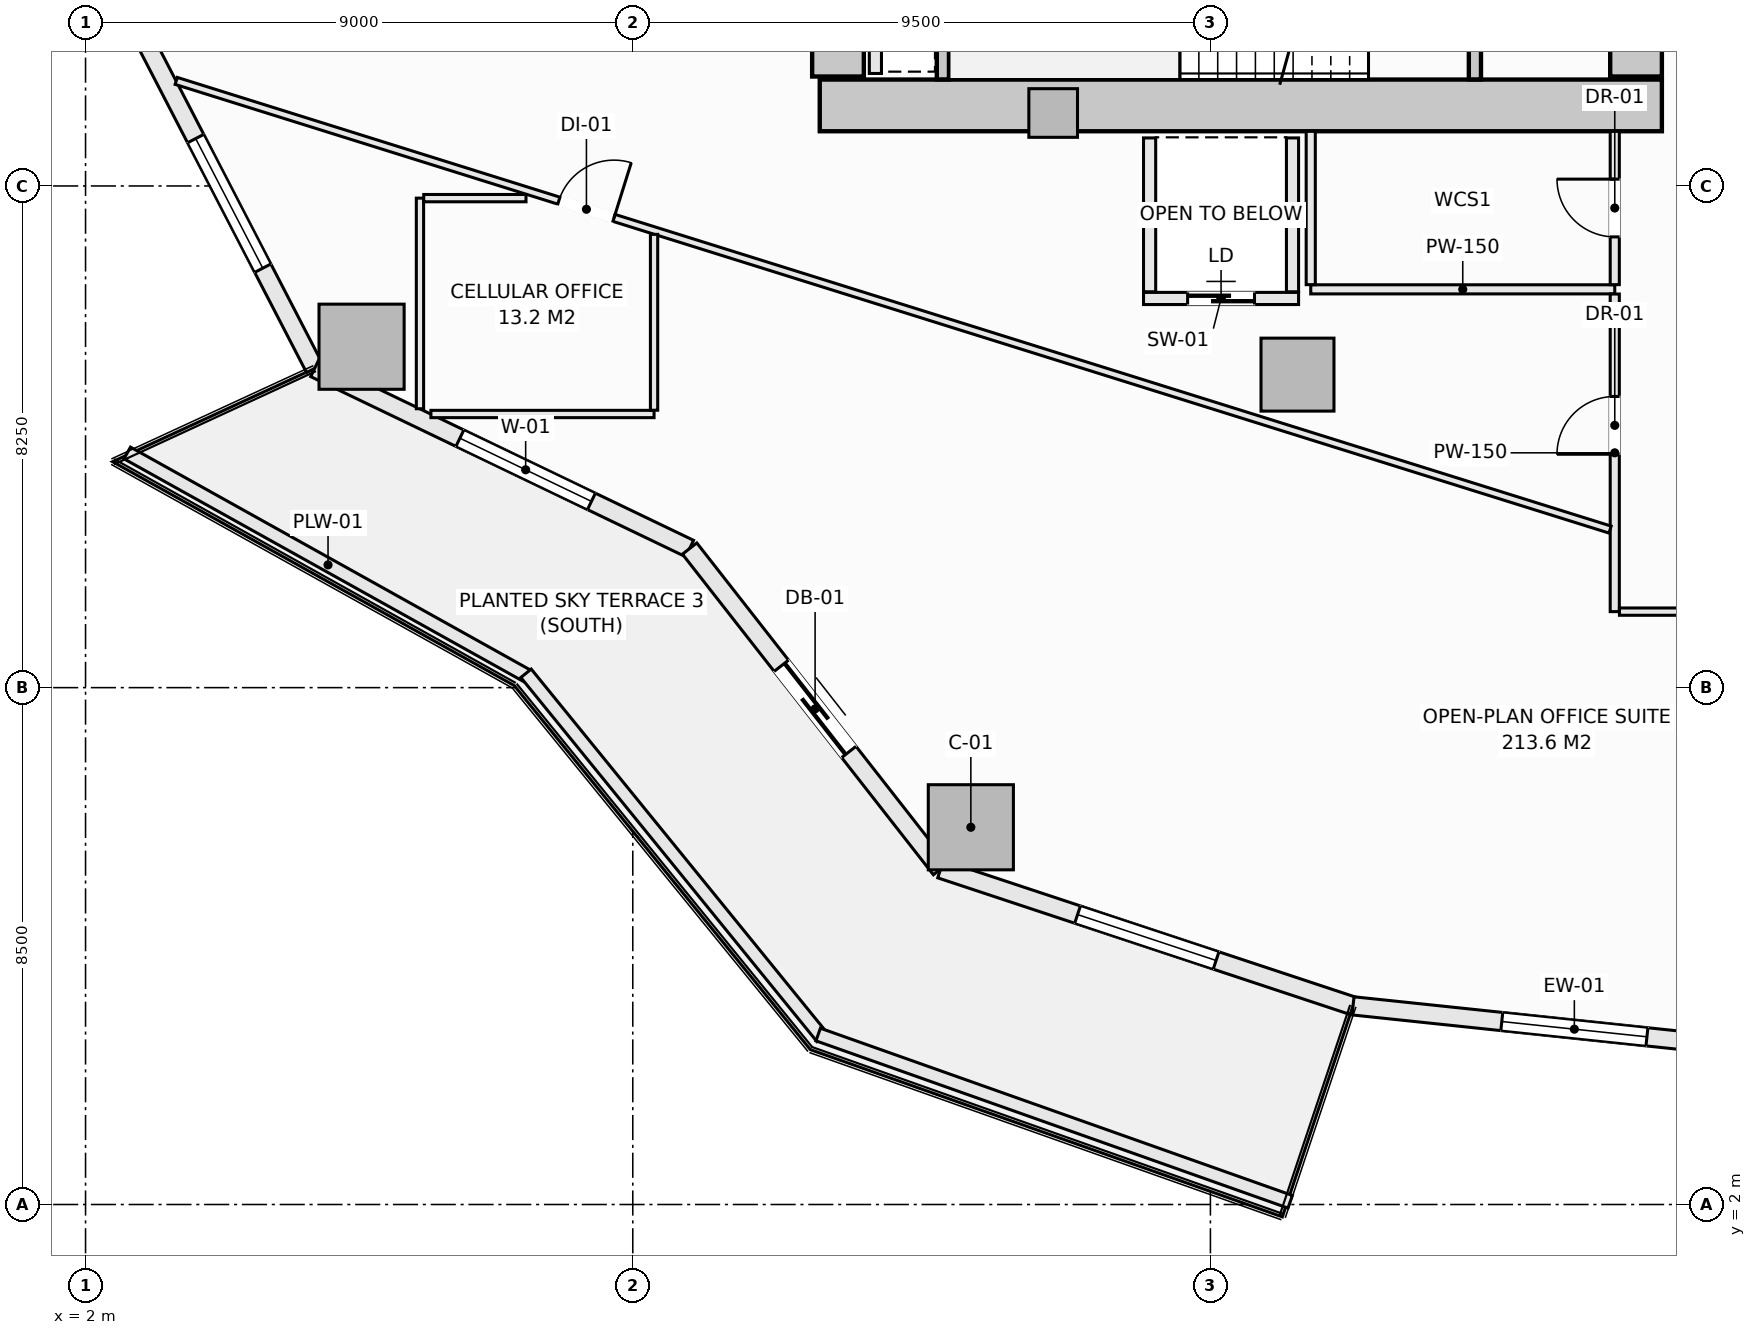
"""IFC4 building model, lengths in metres.
Left out: names, types, materials, properties, quantities, classifications, styles, units other than length and angle.
Written with IfcOpenShell. Run it as: python <this file> out.ifc"""

import sys

from ifc_helpers import new_model, si_unit, direction, frame, frame_2d, origin, origin_2d, place, context, subcontext, project, spatial, rectangle, extrude, element, fill, save


model = new_model("IFC4")
c1 = context("Model", 3, precision=1e-05, world=origin(), true_north=direction((0.0, 1.0)))
c2 = subcontext(c1, "Body", "Model", "MODEL_VIEW")
j1 = project(units=[si_unit("LENGTHUNIT", "METRE"), si_unit("PLANEANGLEUNIT", "RADIAN")], contexts=[c1])
p1 = place(None, origin())
s1 = spatial("IfcSite", under=j1, at=p1, CompositionType="ELEMENT")
p2 = place(p1, origin())
s2 = spatial("IfcBuilding", under=s1, at=p2, CompositionType="ELEMENT")
p3 = place(p2, frame((0.0, 0.0, 30.35)))
s3 = spatial("IfcBuildingStorey", under=s2, at=p3, CompositionType="ELEMENT", Elevation=30.35)
p4 = place(p3, frame((14.075, 20.075, -0.28), z_axis=(0.0, 0.0, 1.0), x_axis=(1.0, 0.0, 0.0)))
e1 = element("IfcWall", 1, at=p4, inside=s3, PredefinedType="SHEAR", context=c2, shape_type="SweptSolid", body=[
    extrude(rectangle(XDim=13.85, YDim=0.85, at=frame_2d((6.925, 0.0))), origin(), (0.0, 0.0, 1.0), 3.85),
])
p5 = place(p3, frame((14.375, 20.55, -0.28), z_axis=(0.0, 0.0, 1.0), x_axis=(0.0, 1.0, 0.0)))
e2 = element("IfcWall", 2, at=p5, inside=s3, PredefinedType="SHEAR", context=c2, shape_type="SweptSolid", body=[
    extrude(rectangle(XDim=12.9, YDim=0.85, at=frame_2d((6.45, 0.0))), origin(), (0.0, 0.0, 1.0), 3.85),
])
p6 = place(p3, frame((27.5, 20.55, -0.28), z_axis=(0.0, 0.0, 1.0), x_axis=(0.0, 1.0, 0.0)))
e3 = element("IfcWall", 3, at=p6, inside=s3, PredefinedType="SHEAR", context=c2, shape_type="SweptSolid", body=[
    extrude(rectangle(XDim=1.5, YDim=0.85, at=frame_2d((0.75, 0.0))), origin(), (0.0, 0.0, 1.0), 3.85),
])
for number, where, z_axis, x_axis in (
    (4, (6.54, 16.106, -0.28), (0.0, 0.0, 1.0), (1.0, 0.0, 0.0)),
    (5, (16.56, 8.204, -0.28), (0.0, 0.0, 1.0), (1.0, 0.0, 0.0)),
):
    element("IfcColumn", number, at=place(p3, frame(where, z_axis=z_axis, x_axis=x_axis)), inside=s3, PredefinedType="COLUMN", context=c2, shape_type="SweptSolid", body=[
        extrude(rectangle(XDim=1.4, YDim=1.4, at=origin_2d()), origin(), (0.0, 0.0, 1.0), 3.85),
    ])
p7 = place(p3, frame((21.932, 15.648, -0.28), z_axis=(0.0, 0.0, 1.0), x_axis=(1.0, 0.0, 0.0)))
e6 = element("IfcColumn", 6, at=p7, inside=s3, PredefinedType="COLUMN", context=c2, shape_type="SweptSolid", body=[
    extrude(rectangle(XDim=1.2, YDim=1.2, at=origin_2d()), origin(), (0.0, 0.0, 1.0), 3.85),
])
p8 = place(p3, frame((17.914, 19.95, -0.28), z_axis=(0.0, 0.0, 1.0), x_axis=(1.0, 0.0, 0.0)))
e7 = element("IfcColumn", 7, at=p8, inside=s3, PredefinedType="PILASTER", context=c2, shape_type="SweptSolid", body=[
    extrude(rectangle(XDim=0.8, YDim=0.8, at=origin_2d()), origin(), (0.0, 0.0, 1.0), 3.85),
])
p9 = place(p3, frame((2.958, 21.177, 0.0), z_axis=(0.0, 0.0, 1.0), x_axis=(0.459809804413, -0.88801742312, 0.0)))
e8 = element("IfcWall", 8, at=p9, inside=s3, PredefinedType="SOLIDWALL", context=c2, shape_type="SweptSolid", body=[
    extrude(rectangle(XDim=6.111, YDim=0.3, at=frame_2d((3.055, 0.0))), origin(), (0.0, 0.0, 1.0), 3.093),
])
p10 = place(p9, frame((1.855, 0.0, 0.85)))
e9 = element("IfcOpeningElement", 9, at=p10, cuts=e8, PredefinedType="OPENING", context=c2, shape_type="SweptSolid", body=[
    extrude(rectangle(XDim=2.4, YDim=1.9, at=frame_2d((1.2, 0.95))), frame((0.0, 0.16, 0.0), z_axis=(0.0, -1.0, 0.0), x_axis=(1.0, 0.0, 0.0)), (0.0, 0.0, 1.0), 0.32),
])
p11 = place(p3, frame((5.768, 15.75, 0.0), z_axis=(0.0, 0.0, 1.0), x_axis=(0.901360393999, -0.433069786673, 0.0)))
e10 = element("IfcWall", 10, at=p11, inside=s3, PredefinedType="SOLIDWALL", context=c2, shape_type="SweptSolid", body=[
    extrude(rectangle(XDim=6.842, YDim=0.3, at=frame_2d((3.421, 0.0))), origin(), (0.0, 0.0, 1.0), 3.093),
])
p12 = place(p11, frame((2.65, 0.0, 0.85)))
e11 = element("IfcOpeningElement", 11, at=p12, cuts=e10, PredefinedType="OPENING", context=c2, shape_type="SweptSolid", body=[
    extrude(rectangle(XDim=2.4, YDim=1.9, at=frame_2d((1.2, 0.95))), frame((0.0, 0.16, 0.0), z_axis=(0.0, -1.0, 0.0), x_axis=(1.0, 0.0, 0.0)), (0.0, 0.0, 1.0), 0.32),
])
p13 = place(p3, frame((11.935, 12.787, 0.0), z_axis=(0.0, 0.0, 1.0), x_axis=(0.616421309777, -0.787416515482, 0.0)))
e12 = element("IfcWall", 12, at=p13, inside=s3, PredefinedType="SOLIDWALL", context=c2, shape_type="SweptSolid", body=[
    extrude(rectangle(XDim=6.696, YDim=0.3, at=frame_2d((3.348, 0.0))), origin(), (0.0, 0.0, 1.0), 3.093),
])
p14 = place(p13, frame((2.448, 0.0, 0.0)))
e13 = element("IfcOpeningElement", 13, at=p14, cuts=e12, PredefinedType="OPENING", context=c2, shape_type="SweptSolid", body=[
    extrude(rectangle(XDim=1.8, YDim=2.25, at=frame_2d((0.9, 1.125))), frame((0.0, 0.16, 0.0), z_axis=(0.0, -1.0, 0.0), x_axis=(1.0, 0.0, 0.0)), (0.0, 0.0, 1.0), 0.32),
])
p15 = place(p3, frame((16.062, 7.514, 0.0), z_axis=(0.0, 0.0, 1.0), x_axis=(0.949238715533, -0.31455661006, 0.0)))
e14 = element("IfcWall", 14, at=p15, inside=s3, PredefinedType="SOLIDWALL", context=c2, shape_type="SweptSolid", body=[
    extrude(rectangle(XDim=7.146, YDim=0.3, at=frame_2d((3.573, 0.0))), origin(), (0.0, 0.0, 1.0), 3.093),
])
p16 = place(p15, frame((2.373, 0.0, 0.85)))
e15 = element("IfcOpeningElement", 15, at=p16, cuts=e14, PredefinedType="OPENING", context=c2, shape_type="SweptSolid", body=[
    extrude(rectangle(XDim=2.4, YDim=1.9, at=frame_2d((1.2, 0.95))), frame((0.0, 0.16, 0.0), z_axis=(0.0, -1.0, 0.0), x_axis=(1.0, 0.0, 0.0)), (0.0, 0.0, 1.0), 0.32),
])
p17 = place(p3, frame((22.846, 5.267, 0.0), z_axis=(0.0, 0.0, 1.0), x_axis=(0.994500334317, -0.104733399844, 0.0)))
e16 = element("IfcWall", 16, at=p17, inside=s3, PredefinedType="SOLIDWALL", context=c2, shape_type="SweptSolid", body=[
    extrude(rectangle(XDim=7.32, YDim=0.3, at=frame_2d((3.66, 0.0))), origin(), (0.0, 0.0, 1.0), 3.093),
])
p18 = place(p17, frame((2.46, 0.0, 0.85)))
e17 = element("IfcOpeningElement", 17, at=p18, cuts=e16, PredefinedType="OPENING", context=c2, shape_type="SweptSolid", body=[
    extrude(rectangle(XDim=2.4, YDim=1.9, at=frame_2d((1.2, 0.95))), frame((0.0, 0.16, 0.0), z_axis=(0.0, -1.0, 0.0), x_axis=(1.0, 0.0, 0.0)), (0.0, 0.0, 1.0), 0.32),
])
p19 = place(p3, frame((2.685, 14.359, 0.0), z_axis=(0.0, 0.0, 1.0), x_axis=(0.873500119739, -0.48682393205, 0.0)))
e18 = element("IfcWall", 18, at=p19, inside=s3, PredefinedType="PARAPET", context=c2, shape_type="SweptSolid", body=[
    extrude(rectangle(XDim=7.562, YDim=0.22, at=frame_2d((3.781, 0.0))), origin(), (0.0, 0.0, 1.0), 0.52),
])
p20 = place(p3, frame((9.244, 10.736, 0.0), z_axis=(0.0, 0.0, 1.0), x_axis=(0.630997450658, -0.775784903993, 0.0)))
e19 = element("IfcWall", 19, at=p20, inside=s3, PredefinedType="PARAPET", context=c2, shape_type="SweptSolid", body=[
    extrude(rectangle(XDim=7.718, YDim=0.22, at=frame_2d((3.859, 0.0))), origin(), (0.0, 0.0, 1.0), 0.52),
])
p21 = place(p3, frame((14.049, 4.795, 0.0), z_axis=(0.0, 0.0, 1.0), x_axis=(0.942581348797, -0.333976647237, 0.0)))
e20 = element("IfcWall", 20, at=p21, inside=s3, PredefinedType="PARAPET", context=c2, shape_type="SweptSolid", body=[
    extrude(rectangle(XDim=8.236, YDim=0.22, at=frame_2d((4.118, 0.0))), origin(), (0.0, 0.0, 1.0), 0.52),
])
p22 = place(p3, frame((24.85, 20.502, -0.28), z_axis=(0.0, 0.0, 1.0), x_axis=(0.0, 1.0, 0.0)))
e21 = element("IfcWall", 21, at=p22, inside=s3, PredefinedType="SHEAR", context=c2, shape_type="SweptSolid", body=[
    extrude(rectangle(XDim=3.038, YDim=0.2, at=frame_2d((1.519, 0.0))), origin(), (0.0, 0.0, 1.0), 3.85),
])
p23 = place(p22, frame((0.969, 0.0, 0.28)))
e22 = element("IfcOpeningElement", 22, at=p23, cuts=e21, PredefinedType="OPENING", context=c2, shape_type="SweptSolid", body=[
    extrude(rectangle(XDim=1.1, YDim=2.15, at=frame_2d((0.55, 1.075))), frame((0.0, 0.11, 0.0), z_axis=(0.0, -1.0, 0.0), x_axis=(1.0, 0.0, 0.0)), (0.0, 0.0, 1.0), 0.22),
])
p24 = place(p3, frame((16.1, 20.502, -0.28), z_axis=(0.0, 0.0, 1.0), x_axis=(0.0, 1.0, 0.0)))
e23 = element("IfcWall", 23, at=p24, inside=s3, PredefinedType="SHEAR", context=c2, shape_type="SweptSolid", body=[
    extrude(rectangle(XDim=3.036, YDim=0.2, at=frame_2d((1.518, 0.0))), origin(), (0.0, 0.0, 1.0), 3.85),
])
p25 = place(p3, frame((19.4, 16.9, 0.0), z_axis=(0.0, 0.0, 1.0), x_axis=(1.0, 0.0, 0.0)))
e24 = element("IfcWall", 24, at=p25, inside=s3, PredefinedType="SOLIDWALL", context=c2, shape_type="SweptSolid", body=[
    extrude(rectangle(XDim=2.55, YDim=0.2, at=frame_2d((1.275, 0.0))), origin(), (0.0, 0.0, 1.0), 3.57),
])
p26 = place(p25, frame((0.725, 0.0, 0.0)))
e25 = element("IfcOpeningElement", 25, at=p26, cuts=e24, PredefinedType="OPENING", context=c2, shape_type="SweptSolid", body=[
    extrude(rectangle(XDim=1.1, YDim=2.2, at=frame_2d((0.55, 1.1))), frame((0.0, 0.11, 0.0), z_axis=(0.0, -1.0, 0.0), x_axis=(1.0, 0.0, 0.0)), (0.0, 0.0, 1.0), 0.22),
])
for number, where, z_axis, x_axis in (
    (26, (19.5, 17.01, 0.0), (0.0, 0.0, 1.0), (0.0, 1.0, 0.0)),
    (27, (21.85, 17.01, 0.0), (0.0, 0.0, 1.0), (0.0, 1.0, 0.0)),
):
    element("IfcWall", number, at=place(p3, frame(where, z_axis=z_axis, x_axis=x_axis)), inside=s3, PredefinedType="SOLIDWALL", context=c2, shape_type="SweptSolid", body=[
        extrude(rectangle(XDim=2.53, YDim=0.2, at=frame_2d((1.265, 0.0))), origin(), (0.0, 0.0, 1.0), 3.57),
    ])
p27 = place(p3, frame((14.99, 20.6, 0.0), z_axis=(0.0, 0.0, 1.0), x_axis=(0.0, 1.0, 0.0)))
e28 = element("IfcWall", 28, at=p27, inside=s3, PredefinedType="SOLIDWALL", context=c2, shape_type="SweptSolid", body=[
    extrude(rectangle(XDim=2.85, YDim=0.2, at=frame_2d((1.425, 0.0))), origin(), (0.0, 0.0, 1.0), 3.57),
])
p28 = place(p3, frame((22.15, 17.05, 0.0), z_axis=(0.0, 0.0, 1.0), x_axis=(1.0, 0.0, 0.0)))
e29 = element("IfcWall", 29, at=p28, inside=s3, PredefinedType="PARTITIONING", context=c2, shape_type="SweptSolid", body=[
    extrude(rectangle(XDim=5.0, YDim=0.15, at=frame_2d((2.5, 0.0))), origin(), (0.0, 0.0, 1.0), 3.57),
])
p29 = place(p3, frame((22.15, 17.127, 0.0), z_axis=(0.0, 0.0, 1.0), x_axis=(0.0, 1.0, 0.0)))
e30 = element("IfcWall", 30, at=p29, inside=s3, PredefinedType="PARTITIONING", context=c2, shape_type="SweptSolid", body=[
    extrude(rectangle(XDim=2.521, YDim=0.15, at=frame_2d((1.26, 0.0))), origin(), (0.0, 0.0, 1.0), 3.57),
])
p30 = place(p3, frame((27.15, 11.75, 0.0), z_axis=(0.0, 0.0, 1.0), x_axis=(0.0, 1.0, 0.0)))
e31 = element("IfcWall", 31, at=p30, inside=s3, PredefinedType="PARTITIONING", context=c2, shape_type="SweptSolid", body=[
    extrude(rectangle(XDim=5.223, YDim=0.15, at=frame_2d((2.611, 0.0))), origin(), (0.0, 0.0, 1.0), 3.57),
])
p31 = place(p30, frame((2.588, 0.0, 0.0)))
e32 = element("IfcOpeningElement", 32, at=p31, cuts=e31, PredefinedType="OPENING", context=c2, shape_type="SweptSolid", body=[
    extrude(rectangle(XDim=0.95, YDim=2.1, at=frame_2d((0.475, 1.05))), frame((0.0, 0.085, 0.0), z_axis=(0.0, -1.0, 0.0), x_axis=(1.0, 0.0, 0.0)), (0.0, 0.0, 1.0), 0.17),
])
p32 = place(p3, frame((27.15, 17.127, 0.0), z_axis=(0.0, 0.0, 1.0), x_axis=(0.0, 1.0, 0.0)))
e33 = element("IfcWall", 33, at=p32, inside=s3, PredefinedType="PARTITIONING", context=c2, shape_type="SweptSolid", body=[
    extrude(rectangle(XDim=2.521, YDim=0.15, at=frame_2d((1.26, 0.0))), origin(), (0.0, 0.0, 1.0), 3.57),
])
p33 = place(p32, frame((0.785, 0.0, 0.0)))
e34 = element("IfcOpeningElement", 34, at=p33, cuts=e33, PredefinedType="OPENING", context=c2, shape_type="SweptSolid", body=[
    extrude(rectangle(XDim=0.95, YDim=2.1, at=frame_2d((0.475, 1.05))), frame((0.0, 0.085, 0.0), z_axis=(0.0, -1.0, 0.0), x_axis=(1.0, 0.0, 0.0)), (0.0, 0.0, 1.0), 0.17),
])
p34 = place(p3, frame((27.227, 11.75, 0.0), z_axis=(0.0, 0.0, 1.0), x_axis=(1.0, 0.0, 0.0)))
e35 = element("IfcWall", 35, at=p34, inside=s3, PredefinedType="PARTITIONING", context=c2, shape_type="SweptSolid", body=[
    extrude(rectangle(XDim=8.661, YDim=0.12, at=frame_2d((4.331, 0.0))), origin(), (0.0, 0.0, 1.0), 3.57),
])
p35 = place(p34, frame((2.091, 0.0, 0.0)))
e36 = element("IfcOpeningElement", 36, at=p35, cuts=e35, PredefinedType="OPENING", context=c2, shape_type="SweptSolid", body=[
    extrude(rectangle(XDim=0.95, YDim=2.1, at=frame_2d((0.475, 1.05))), frame((0.0, 0.07, 0.0), z_axis=(0.0, -1.0, 0.0), x_axis=(1.0, 0.0, 0.0)), (0.0, 0.0, 1.0), 0.14),
])
p36 = place(p34, frame((7.408, 0.0, 0.0)))
e37 = element("IfcOpeningElement", 37, at=p36, cuts=e35, PredefinedType="OPENING", context=c2, shape_type="SweptSolid", body=[
    extrude(rectangle(XDim=0.95, YDim=2.1, at=frame_2d((0.475, 1.05))), frame((0.0, 0.07, 0.0), z_axis=(0.0, -1.0, 0.0), x_axis=(1.0, 0.0, 0.0)), (0.0, 0.0, 1.0), 0.14),
])
p37 = place(p3, frame((3.491, 20.478, 0.0), z_axis=(0.0, 0.0, 1.0), x_axis=(0.954372143903, -0.298619843517, 0.0)))
e38 = element("IfcWall", 38, at=p37, inside=s3, PredefinedType="PARTITIONING", context=c2, shape_type="SweptSolid", body=[
    extrude(rectangle(XDim=24.709, YDim=0.12, at=frame_2d((12.354, 0.0))), origin(), (0.0, 0.0, 1.0), 3.205),
])
p38 = place(p37, frame((6.594, 0.0, 0.0)))
e39 = element("IfcOpeningElement", 39, at=p38, cuts=e38, PredefinedType="OPENING", context=c2, shape_type="SweptSolid", body=[
    extrude(rectangle(XDim=0.95, YDim=2.1, at=frame_2d((0.475, 1.05))), frame((0.0, 0.07, 0.0), z_axis=(0.0, -1.0, 0.0), x_axis=(1.0, 0.0, 0.0)), (0.0, 0.0, 1.0), 0.14),
])
p39 = place(p3, frame((7.68, 15.0, 0.0), z_axis=(0.0, 0.0, 1.0), x_axis=(1.0, 0.0, 0.0)))
e40 = element("IfcWall", 40, at=p39, inside=s3, PredefinedType="PARTITIONING", context=c2, shape_type="SweptSolid", body=[
    extrude(rectangle(XDim=3.67, YDim=0.12, at=frame_2d((1.835, 0.0))), origin(), (0.0, 0.0, 1.0), 3.093),
])
p40 = place(p3, frame((11.35, 15.062, 0.0), z_axis=(0.0, 0.0, 1.0), x_axis=(0.0, 1.0, 0.0)))
e41 = element("IfcWall", 41, at=p40, inside=s3, PredefinedType="PARTITIONING", context=c2, shape_type="SweptSolid", body=[
    extrude(rectangle(XDim=2.892, YDim=0.12, at=frame_2d((1.446, 0.0))), origin(), (0.0, 0.0, 1.0), 3.57),
])
p41 = place(p3, frame((7.5, 15.086, 0.0), z_axis=(0.0, 0.0, 1.0), x_axis=(0.0, 1.0, 0.0)))
e42 = element("IfcWall", 42, at=p41, inside=s3, PredefinedType="PARTITIONING", context=c2, shape_type="SweptSolid", body=[
    extrude(rectangle(XDim=3.464, YDim=0.12, at=frame_2d((1.732, 0.0))), origin(), (0.0, 0.0, 1.0), 3.57),
])
p42 = place(p3, frame((7.562, 18.55, 0.0), z_axis=(0.0, 0.0, 1.0), x_axis=(1.0, 0.0, 0.0)))
e43 = element("IfcWall", 43, at=p42, inside=s3, PredefinedType="PARTITIONING", context=c2, shape_type="SweptSolid", body=[
    extrude(rectangle(XDim=1.682, YDim=0.12, at=frame_2d((0.841, 0.0))), origin(), (0.0, 0.0, 1.0), 3.57),
])
p43 = place(p10, origin())
e44 = element("IfcWindow", 44, at=p43, inside=s3, PartitioningType="SINGLE_PANEL", PredefinedType="WINDOW", context=c2, shape_type="SweptSolid", body=[
    extrude(rectangle(XDim=2.4, YDim=1.9, at=frame_2d((1.2, 0.95))), frame((0.0, 0.03, 0.0), z_axis=(0.0, -1.0, 0.0), x_axis=(1.0, 0.0, 0.0)), (0.0, 0.0, 1.0), 0.06),
])
fill(e9, e44)
p44 = place(p12, origin())
e45 = element("IfcWindow", 45, at=p44, inside=s3, PartitioningType="SINGLE_PANEL", PredefinedType="WINDOW", context=c2, shape_type="SweptSolid", body=[
    extrude(rectangle(XDim=2.4, YDim=1.9, at=frame_2d((1.2, 0.95))), frame((0.0, 0.03, 0.0), z_axis=(0.0, -1.0, 0.0), x_axis=(1.0, 0.0, 0.0)), (0.0, 0.0, 1.0), 0.06),
])
fill(e11, e45)
p45 = place(p14, frame((1.8, 0.0, 0.0), z_axis=(0.0, 0.0, 1.0), x_axis=(-1.0, 0.0, 0.0)))
e46 = element("IfcDoor", 46, at=p45, inside=s3, OperationType="SLIDING_TO_LEFT", PredefinedType="DOOR", context=c2, shape_type="SweptSolid", body=[
    extrude(rectangle(XDim=1.8, YDim=2.25, at=frame_2d((0.9, 1.125))), frame((0.0, 0.025, 0.0), z_axis=(0.0, -1.0, 0.0), x_axis=(1.0, 0.0, 0.0)), (0.0, 0.0, 1.0), 0.05),
])
fill(e13, e46)
p46 = place(p16, origin())
e47 = element("IfcWindow", 47, at=p46, inside=s3, PartitioningType="SINGLE_PANEL", PredefinedType="WINDOW", context=c2, shape_type="SweptSolid", body=[
    extrude(rectangle(XDim=2.4, YDim=1.9, at=frame_2d((1.2, 0.95))), frame((0.0, 0.03, 0.0), z_axis=(0.0, -1.0, 0.0), x_axis=(1.0, 0.0, 0.0)), (0.0, 0.0, 1.0), 0.06),
])
fill(e15, e47)
p47 = place(p18, origin())
e48 = element("IfcWindow", 48, at=p47, inside=s3, PartitioningType="SINGLE_PANEL", PredefinedType="WINDOW", context=c2, shape_type="SweptSolid", body=[
    extrude(rectangle(XDim=2.4, YDim=1.9, at=frame_2d((1.2, 0.95))), frame((0.0, 0.03, 0.0), z_axis=(0.0, -1.0, 0.0), x_axis=(1.0, 0.0, 0.0)), (0.0, 0.0, 1.0), 0.06),
])
fill(e17, e48)
p48 = place(p26, origin())
e49 = element("IfcDoor", 49, at=p48, inside=s3, OperationType="SLIDING_TO_LEFT", PredefinedType="DOOR", context=c2, shape_type="SweptSolid", body=[
    extrude(rectangle(XDim=1.1, YDim=2.2, at=frame_2d((0.55, 1.1))), frame((0.0, 0.025, 0.0), z_axis=(0.0, -1.0, 0.0), x_axis=(1.0, 0.0, 0.0)), (0.0, 0.0, 1.0), 0.05),
])
fill(e25, e49)
p49 = place(p33, origin())
e50 = element("IfcDoor", 50, at=p49, inside=s3, OperationType="SINGLE_SWING_RIGHT", PredefinedType="DOOR", context=c2, shape_type="SweptSolid", body=[
    extrude(rectangle(XDim=0.95, YDim=2.1, at=frame_2d((0.475, 1.05))), frame((0.0, 0.025, 0.0), z_axis=(0.0, -1.0, 0.0), x_axis=(1.0, 0.0, 0.0)), (0.0, 0.0, 1.0), 0.05),
])
fill(e34, e50)
p50 = place(p31, origin())
e51 = element("IfcDoor", 51, at=p50, inside=s3, OperationType="SINGLE_SWING_LEFT", PredefinedType="DOOR", context=c2, shape_type="SweptSolid", body=[
    extrude(rectangle(XDim=0.95, YDim=2.1, at=frame_2d((0.475, 1.05))), frame((0.0, 0.025, 0.0), z_axis=(0.0, -1.0, 0.0), x_axis=(1.0, 0.0, 0.0)), (0.0, 0.0, 1.0), 0.05),
])
fill(e32, e51)
p51 = place(p38, origin())
e52 = element("IfcDoor", 52, at=p51, inside=s3, OperationType="SINGLE_SWING_RIGHT", PredefinedType="DOOR", context=c2, shape_type="SweptSolid", body=[
    extrude(rectangle(XDim=0.95, YDim=2.1, at=frame_2d((0.475, 1.05))), frame((0.0, 0.025, 0.0), z_axis=(0.0, -1.0, 0.0), x_axis=(1.0, 0.0, 0.0)), (0.0, 0.0, 1.0), 0.05),
])
fill(e39, e52)
save(model, sys.argv[1])
